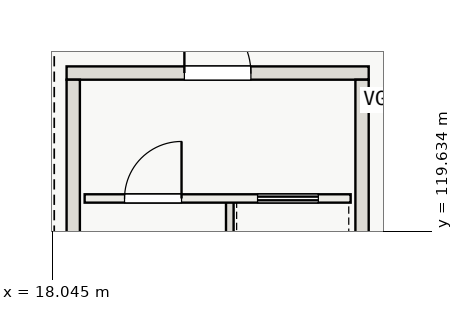
"""IFC4 building model, lengths in metres.
Left out: names, types, materials, properties, quantities, classifications, styles, units other than length and angle.
Written with IfcOpenShell. Run it as: python <this file> out.ifc"""

import sys

from ifc_helpers import new_model, si_unit, direction, frame, frame_2d, origin, place, context, subcontext, project, spatial, rectangle, extrude, element, fill, save


model = new_model("IFC4")
c1 = context("Model", 3, precision=1e-05, world=origin(), true_north=direction((0.0, 1.0)))
c2 = subcontext(c1, "Body", "Model", "MODEL_VIEW")
j1 = project(units=[si_unit("LENGTHUNIT", "METRE"), si_unit("PLANEANGLEUNIT", "RADIAN")], contexts=[c1])
p1 = place(None, origin())
s1 = spatial("IfcSite", under=j1, at=p1, CompositionType="ELEMENT")
p2 = place(p1, origin())
s2 = spatial("IfcBuilding", under=s1, at=p2, CompositionType="ELEMENT")
p3 = place(p2, frame((0.0, 0.0, 12.0)))
s3 = spatial("IfcBuildingStorey", under=s2, at=p3, CompositionType="ELEMENT", Elevation=12.0)
p4 = place(p3, frame((18.425, 123.8, 0.0), z_axis=(0.0, 0.0, 1.0), x_axis=(1.0, 0.0, 0.0)))
e1 = element("IfcWall", 1, at=p4, inside=s3, PredefinedType="SHEAR", context=c2, shape_type="SweptSolid", body=[
    extrude(rectangle(XDim=7.95, YDim=0.35, at=frame_2d((3.975, 0.0))), origin(), (0.0, 0.0, 1.0), 4.8),
])
p5 = place(p4, frame((3.1, 0.0, 0.0)))
e2 = element("IfcOpeningElement", 2, at=p5, cuts=e1, PredefinedType="OPENING", context=c2, shape_type="SweptSolid", body=[
    extrude(rectangle(XDim=1.75, YDim=2.3, at=frame_2d((0.875, 1.15))), frame((0.0, 0.185, 0.0), z_axis=(0.0, -1.0, 0.0), x_axis=(1.0, 0.0, 0.0)), (0.0, 0.0, 1.0), 0.37),
])
for number, where, z_axis, x_axis in (
    (3, (18.6, 112.375, 0.0), (0.0, 0.0, 1.0), (0.0, 1.0, 0.0)),
    (4, (26.2, 112.375, 0.0), (0.0, 0.0, 1.0), (0.0, 1.0, 0.0)),
):
    element("IfcWall", number, at=place(p3, frame(where, z_axis=z_axis, x_axis=x_axis)), inside=s3, PredefinedType="SHEAR", context=c2, shape_type="SweptSolid", body=[
        extrude(rectangle(XDim=11.25, YDim=0.35, at=frame_2d((5.625, 0.0))), origin(), (0.0, 0.0, 1.0), 4.8),
    ])
p6 = place(p3, frame((22.72, 112.45, 0.0), z_axis=(0.0, 0.0, 1.0), x_axis=(0.0, 1.0, 0.0)))
e5 = element("IfcWall", 5, at=p6, inside=s3, PredefinedType="SOLIDWALL", context=c2, shape_type="SweptSolid", body=[
    extrude(rectangle(XDim=8.0, YDim=0.2, at=frame_2d((4.0, 0.0))), origin(), (0.0, 0.0, 1.0), 4.8),
])
p7 = place(p3, frame((18.9, 120.5, 0.0), z_axis=(0.0, 0.0, 1.0), x_axis=(1.0, 0.0, 0.0)))
e6 = element("IfcWall", 6, at=p7, inside=s3, PredefinedType="SOLIDWALL", context=c2, shape_type="SweptSolid", body=[
    extrude(rectangle(XDim=7.0, YDim=0.22, at=frame_2d((3.5, 0.0))), origin(), (0.0, 0.0, 1.0), 4.5),
])
p8 = place(p7, frame((1.05, 0.0, 0.0)))
e7 = element("IfcOpeningElement", 7, at=p8, cuts=e6, PredefinedType="OPENING", context=c2, shape_type="SweptSolid", body=[
    extrude(rectangle(XDim=1.5, YDim=2.2, at=frame_2d((0.75, 1.1))), frame((0.0, 0.12, 0.0), z_axis=(0.0, -1.0, 0.0), x_axis=(1.0, 0.0, 0.0)), (0.0, 0.0, 1.0), 0.24),
])
p9 = place(p7, frame((4.55, 0.0, 0.0)))
e8 = element("IfcOpeningElement", 8, at=p9, cuts=e6, PredefinedType="OPENING", context=c2, shape_type="SweptSolid", body=[
    extrude(rectangle(XDim=1.6, YDim=2.3, at=frame_2d((0.8, 1.15))), frame((0.0, 0.12, 0.0), z_axis=(0.0, -1.0, 0.0), x_axis=(1.0, 0.0, 0.0)), (0.0, 0.0, 1.0), 0.24),
])
p10 = place(p8, origin())
e9 = element("IfcDoor", 9, at=p10, inside=s3, OperationType="SINGLE_SWING_RIGHT", PredefinedType="DOOR", context=c2, shape_type="SweptSolid", body=[
    extrude(rectangle(XDim=1.5, YDim=2.2, at=frame_2d((0.75, 1.1))), frame((0.0, 0.025, 0.0), z_axis=(0.0, -1.0, 0.0), x_axis=(1.0, 0.0, 0.0)), (0.0, 0.0, 1.0), 0.05),
])
fill(e7, e9)
p11 = place(p9, origin())
e10 = element("IfcDoor", 10, at=p11, inside=s3, OperationType="SLIDING_TO_RIGHT", PredefinedType="DOOR", context=c2, shape_type="SweptSolid", body=[
    extrude(rectangle(XDim=1.6, YDim=2.3, at=frame_2d((0.8, 1.15))), frame((0.0, 0.025, 0.0), z_axis=(0.0, -1.0, 0.0), x_axis=(1.0, 0.0, 0.0)), (0.0, 0.0, 1.0), 0.05),
])
fill(e8, e10)
p12 = place(p5, origin())
e11 = element("IfcDoor", 11, at=p12, inside=s3, OperationType="DOUBLE_DOOR_SINGLE_SWING", PredefinedType="DOOR", context=c2, shape_type="SweptSolid", body=[
    extrude(rectangle(XDim=1.75, YDim=2.3, at=frame_2d((0.875, 1.15))), frame((0.0, 0.025, 0.0), z_axis=(0.0, -1.0, 0.0), x_axis=(1.0, 0.0, 0.0)), (0.0, 0.0, 1.0), 0.05),
])
fill(e2, e11)
save(model, sys.argv[1])
